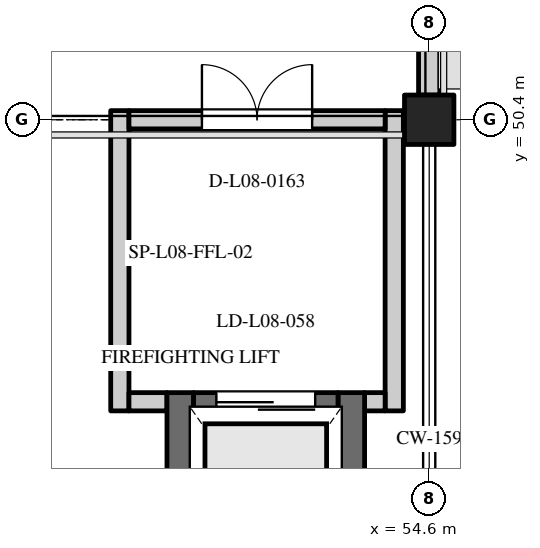
"""IFC4 building model, lengths in metres.
Left out: names, types, materials, properties, quantities, classifications, styles, units other than length and angle.
Written with IfcOpenShell. Run it as: python <this file> out.ifc"""

import sys

from ifc_helpers import new_model, si_unit, direction, frame, frame_2d, origin, origin_2d, place, context, subcontext, project, spatial, rectangle, extrude, element, fill, save


model = new_model("IFC4")
c1 = context("Model", 3, precision=1e-05, world=origin(), true_north=direction((0.0, 1.0)))
c2 = subcontext(c1, "Body", "Model", "MODEL_VIEW")
j1 = project(units=[si_unit("LENGTHUNIT", "METRE"), si_unit("PLANEANGLEUNIT", "RADIAN")], contexts=[c1])
p1 = place(None, origin())
s1 = spatial("IfcSite", under=j1, at=p1, CompositionType="ELEMENT")
p2 = place(p1, origin())
s2 = spatial("IfcBuilding", under=s1, at=p2, CompositionType="ELEMENT")
p3 = place(p2, frame((0.0, 0.0, 33.9)))
s3 = spatial("IfcBuildingStorey", under=s2, at=p3, CompositionType="ELEMENT", Elevation=33.9)
p4 = place(p3, frame((54.6, 50.4, 0.0), z_axis=(0.0, 0.0, 1.0), x_axis=(1.0, 0.0, 0.0)))
e1 = element("IfcColumn", 1, at=p4, inside=s3, PredefinedType="COLUMN", context=c2, shape_type="SweptSolid", body=[
    extrude(rectangle(XDim=0.65, YDim=0.65, at=origin_2d()), origin(), (0.0, 0.0, 1.0), 3.9),
])
p5 = place(p3, frame((54.6, 50.725, 0.0), z_axis=(0.0, 0.0, 1.0), x_axis=(0.0, 1.0, 0.0)))
e2 = element("IfcWall", 2, at=p5, inside=s3, PredefinedType="STANDARD", context=c2, shape_type="SweptSolid", body=[
    extrude(rectangle(XDim=7.75, YDim=0.28, at=frame_2d((3.875, 0.0))), origin(), (0.0, 0.0, 1.0), 2.95),
])
p6 = place(p5, frame((0.959, 0.0, 0.8)))
e3 = element("IfcOpeningElement", 3, at=p6, cuts=e2, PredefinedType="OPENING", context=c2, shape_type="SweptSolid", body=[
    extrude(rectangle(XDim=1.8, YDim=1.55, at=frame_2d((0.9, 0.775))), frame((0.0, 0.152, 0.0), z_axis=(0.0, -1.0, 0.0), x_axis=(1.0, 0.0, 0.0)), (0.0, 0.0, 1.0), 0.304),
])
p7 = place(p5, frame((4.991, 0.0, 0.8)))
e4 = element("IfcOpeningElement", 4, at=p7, cuts=e2, PredefinedType="OPENING", context=c2, shape_type="SweptSolid", body=[
    extrude(rectangle(XDim=1.8, YDim=1.55, at=frame_2d((0.9, 0.775))), frame((0.0, 0.152, 0.0), z_axis=(0.0, -1.0, 0.0), x_axis=(1.0, 0.0, 0.0)), (0.0, 0.0, 1.0), 0.304),
])
for number, where, z_axis, x_axis in (
    (5, (51.325, 43.06, 0.0), (0.0, 0.0, 1.0), (0.0, 1.0, 0.0)),
    (6, (53.575, 43.06, 0.0), (0.0, 0.0, 1.0), (0.0, 1.0, 0.0)),
):
    element("IfcWall", number, at=place(p3, frame(where, z_axis=z_axis, x_axis=x_axis)), inside=s3, PredefinedType="SHEAR", context=c2, shape_type="SweptSolid", body=[
        extrude(rectangle(XDim=3.75, YDim=0.35, at=frame_2d((1.875, 0.0))), origin(), (0.0, 0.0, 1.0), 3.6),
    ])
p8 = place(p3, frame((51.5, 46.635, 0.0), z_axis=(0.0, 0.0, 1.0), x_axis=(1.0, 0.0, 0.0)))
e7 = element("IfcWall", 7, at=p8, inside=s3, PredefinedType="SHEAR", context=c2, shape_type="SweptSolid", body=[
    extrude(rectangle(XDim=1.9, YDim=0.35, at=frame_2d((0.95, 0.0))), origin(), (0.0, 0.0, 1.0), 3.6),
])
p9 = place(p8, frame((0.3, 0.0, 0.0)))
e8 = element("IfcOpeningElement", 8, at=p9, cuts=e7, PredefinedType="OPENING", context=c2, shape_type="SweptSolid", body=[
    extrude(rectangle(XDim=1.3, YDim=2.2, at=frame_2d((0.65, 1.1))), frame((0.0, 0.187, 0.0), z_axis=(0.0, -1.0, 0.0), x_axis=(1.0, 0.0, 0.0)), (0.0, 0.0, 1.0), 0.374),
])
for number, where, z_axis, x_axis in (
    (9, (50.53, 46.57, 0.0), (0.0, 0.0, 1.0), (0.0, 1.0, 0.0)),
    (10, (54.14, 46.57, 0.0), (0.0, 0.0, 1.0), (0.0, 1.0, 0.0)),
):
    element("IfcWall", number, at=place(p3, frame(where, z_axis=z_axis, x_axis=x_axis)), inside=s3, PredefinedType="STANDARD", context=c2, shape_type="SweptSolid", body=[
        extrude(rectangle(XDim=3.95, YDim=0.24, at=frame_2d((1.975, 0.0))), origin(), (0.0, 0.0, 1.0), 3.1),
    ])
p10 = place(p3, frame((50.65, 46.69, 0.0), z_axis=(0.0, 0.0, 1.0), x_axis=(1.0, 0.0, 0.0)))
e11 = element("IfcWall", 11, at=p10, inside=s3, PredefinedType="STANDARD", context=c2, shape_type="SweptSolid", body=[
    extrude(rectangle(XDim=0.5, YDim=0.24, at=frame_2d((0.25, 0.0))), origin(), (0.0, 0.0, 1.0), 3.1),
])
p11 = place(p3, frame((53.75, 46.69, 0.0), z_axis=(0.0, 0.0, 1.0), x_axis=(1.0, 0.0, 0.0)))
e12 = element("IfcWall", 12, at=p11, inside=s3, PredefinedType="STANDARD", context=c2, shape_type="SweptSolid", body=[
    extrude(rectangle(XDim=0.27, YDim=0.24, at=frame_2d((0.135, 0.0))), origin(), (0.0, 0.0, 1.0), 3.1),
])
p12 = place(p3, frame((50.65, 50.4, 0.0), z_axis=(0.0, 0.0, 1.0), x_axis=(1.0, 0.0, 0.0)))
e13 = element("IfcWall", 13, at=p12, inside=s3, PredefinedType="STANDARD", context=c2, shape_type="SweptSolid", body=[
    extrude(rectangle(XDim=3.37, YDim=0.24, at=frame_2d((1.685, 0.0))), origin(), (0.0, 0.0, 1.0), 3.1),
])
p13 = place(p12, frame((0.96, 0.0, 0.0)))
e14 = element("IfcOpeningElement", 14, at=p13, cuts=e13, PredefinedType="OPENING", context=c2, shape_type="SweptSolid", body=[
    extrude(rectangle(XDim=1.45, YDim=2.2, at=frame_2d((0.725, 1.1))), frame((0.0, 0.132, 0.0), z_axis=(0.0, -1.0, 0.0), x_axis=(1.0, 0.0, 0.0)), (0.0, 0.0, 1.0), 0.264),
])
p14 = place(p9, origin())
e15 = element("IfcDoor", 15, at=p14, inside=s3, OperationType="SLIDING_TO_LEFT", PredefinedType="DOOR", context=c2, shape_type="SweptSolid", body=[
    extrude(rectangle(XDim=1.3, YDim=2.2, at=frame_2d((0.65, 1.1))), frame((0.0, 0.025, 0.0), z_axis=(0.0, -1.0, 0.0), x_axis=(1.0, 0.0, 0.0)), (0.0, 0.0, 1.0), 0.05),
])
fill(e8, e15)
p15 = place(p13, origin())
e16 = element("IfcDoor", 16, at=p15, inside=s3, OperationType="DOUBLE_DOOR_SINGLE_SWING", PredefinedType="DOOR", context=c2, shape_type="SweptSolid", body=[
    extrude(rectangle(XDim=1.45, YDim=2.2, at=frame_2d((0.725, 1.1))), frame((0.0, 0.025, 0.0), z_axis=(0.0, -1.0, 0.0), x_axis=(1.0, 0.0, 0.0)), (0.0, 0.0, 1.0), 0.05),
])
fill(e14, e16)
save(model, sys.argv[1])
